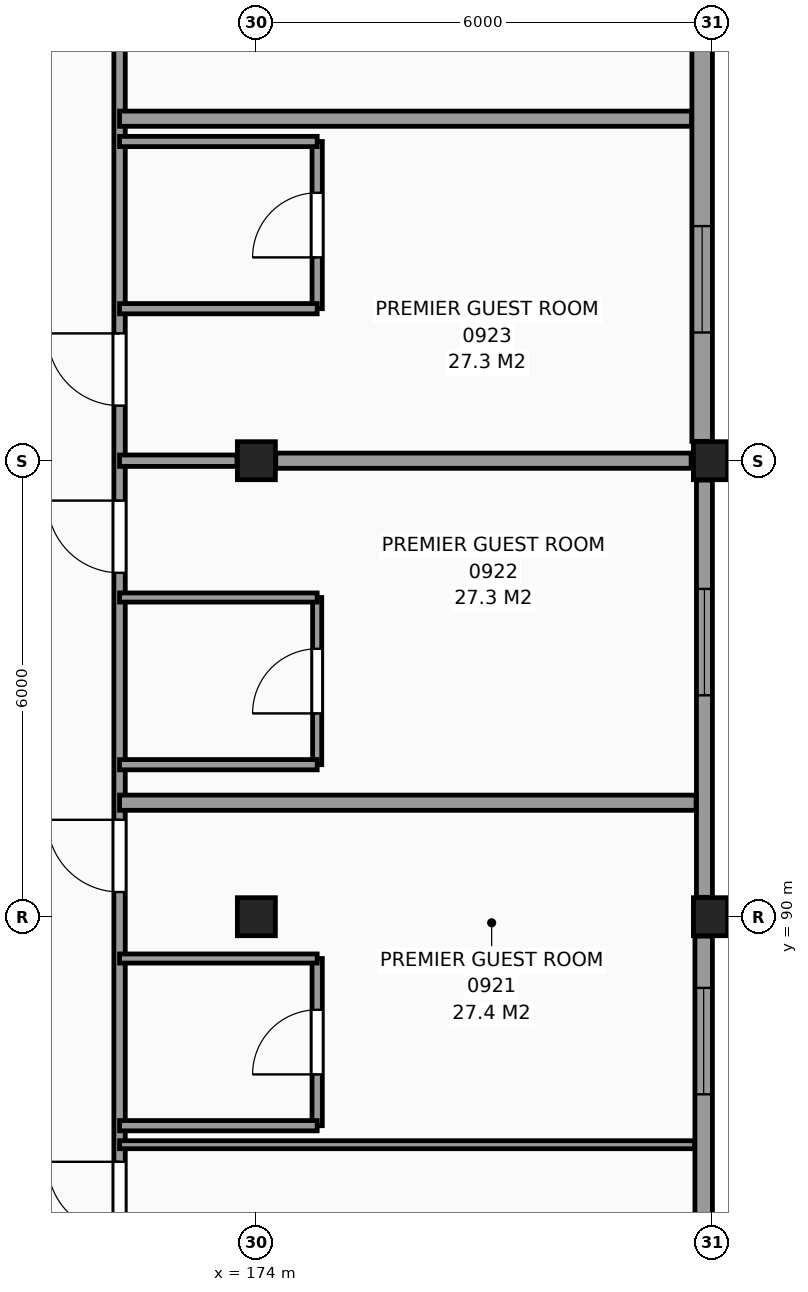
"""IFC4 building model, lengths in metres.
Left out: names, types, materials, properties, quantities, classifications, styles, units other than length and angle.
Written with IfcOpenShell. Run it as: python <this file> out.ifc"""

import sys

from ifc_helpers import new_model, si_unit, direction, frame, frame_2d, origin, origin_2d, place, context, subcontext, project, spatial, rectangle, extrude, element, fill, save


model = new_model("IFC4")
c1 = context("Model", 3, precision=1e-05, world=origin(), true_north=direction((0.0, 1.0)))
c2 = subcontext(c1, "Body", "Model", "MODEL_VIEW")
j1 = project(units=[si_unit("LENGTHUNIT", "METRE"), si_unit("PLANEANGLEUNIT", "RADIAN")], contexts=[c1])
p1 = place(None, origin())
s1 = spatial("IfcSite", under=j1, at=p1, CompositionType="ELEMENT")
p2 = place(p1, origin())
s2 = spatial("IfcBuilding", under=s1, at=p2, CompositionType="ELEMENT")
p3 = place(p2, frame((0.0, 0.0, 38.1)))
s3 = spatial("IfcBuildingStorey", under=s2, at=p3, CompositionType="ELEMENT", Elevation=38.1)
for number, where, z_axis, x_axis in (
    (1, (174.0, 90.0, 0.0), (0.0, 0.0, 1.0), (1.0, 0.0, 0.0)),
    (2, (174.0, 96.0, 0.0), (0.0, 0.0, 1.0), (1.0, 0.0, 0.0)),
    (3, (180.0, 90.0, 0.0), (0.0, 0.0, 1.0), (1.0, 0.0, 0.0)),
    (4, (180.0, 96.0, 0.0), (0.0, 0.0, 1.0), (1.0, 0.0, 0.0)),
):
    element("IfcColumn", number, at=place(p3, frame(where, z_axis=z_axis, x_axis=x_axis)), inside=s3, PredefinedType="COLUMN", context=c2, shape_type="SweptSolid", body=[
        extrude(rectangle(XDim=0.5, YDim=0.5, at=origin_2d()), origin(), (0.0, 0.0, 1.0), 3.3),
    ])
p4 = place(p3, frame((179.885, 84.255, 0.0), z_axis=(0.0, 0.0, 1.0), x_axis=(0.0, 1.0, 0.0)))
e5 = element("IfcWall", 5, at=p4, inside=s3, PredefinedType="SOLIDWALL", context=c2, shape_type="SweptSolid", body=[
    extrude(rectangle(XDim=5.49, YDim=0.23, at=frame_2d((2.745, 0.0))), origin(), (0.0, 0.0, 1.0), 2.41),
])
p5 = place(p4, frame((3.408, 0.0, 0.8)))
e6 = element("IfcOpeningElement", 6, at=p5, cuts=e5, PredefinedType="OPENING", context=c2, shape_type="SweptSolid", body=[
    extrude(rectangle(XDim=1.4, YDim=1.4, at=frame_2d((0.7, 0.7))), frame((0.0, 0.125, 0.0), z_axis=(0.0, -1.0, 0.0), x_axis=(1.0, 0.0, 0.0)), (0.0, 0.0, 1.0), 0.25),
])
p6 = place(p3, frame((179.895, 90.255, 0.0), z_axis=(0.0, 0.0, 1.0), x_axis=(0.0, 1.0, 0.0)))
e7 = element("IfcWall", 7, at=p6, inside=s3, PredefinedType="SOLIDWALL", context=c2, shape_type="SweptSolid", body=[
    extrude(rectangle(XDim=5.49, YDim=0.21, at=frame_2d((2.745, 0.0))), origin(), (0.0, 0.0, 1.0), 2.41),
])
p7 = place(p6, frame((2.658, 0.0, 0.8)))
e8 = element("IfcOpeningElement", 8, at=p7, cuts=e7, PredefinedType="OPENING", context=c2, shape_type="SweptSolid", body=[
    extrude(rectangle(XDim=1.4, YDim=1.4, at=frame_2d((0.7, 0.7))), frame((0.0, 0.115, 0.0), z_axis=(0.0, -1.0, 0.0), x_axis=(1.0, 0.0, 0.0)), (0.0, 0.0, 1.0), 0.23),
])
p8 = place(p3, frame((179.865, 96.255, 0.0), z_axis=(0.0, 0.0, 1.0), x_axis=(0.0, 1.0, 0.0)))
e9 = element("IfcWall", 9, at=p8, inside=s3, PredefinedType="SOLIDWALL", context=c2, shape_type="SweptSolid", body=[
    extrude(rectangle(XDim=5.49, YDim=0.27, at=frame_2d((2.745, 0.0))), origin(), (0.0, 0.0, 1.0), 2.41),
])
p9 = place(p8, frame((1.432, 0.0, 0.8)))
e10 = element("IfcOpeningElement", 10, at=p9, cuts=e9, PredefinedType="OPENING", context=c2, shape_type="SweptSolid", body=[
    extrude(rectangle(XDim=1.4, YDim=1.4, at=frame_2d((0.7, 0.7))), frame((0.0, 0.145, 0.0), z_axis=(0.0, -1.0, 0.0), x_axis=(1.0, 0.0, 0.0)), (0.0, 0.0, 1.0), 0.29),
])
p10 = place(p3, frame((172.2, 42.215, 0.0), z_axis=(0.0, 0.0, 1.0), x_axis=(0.0, 1.0, 0.0)))
e11 = element("IfcWall", 11, at=p10, inside=s3, PredefinedType="PARTITIONING", context=c2, shape_type="SweptSolid", body=[
    extrude(rectangle(XDim=65.605, YDim=0.15, at=frame_2d((32.802, 0.0))), origin(), (0.0, 0.0, 1.0), 3.06),
])
p11 = place(p10, frame((0.46, 0.0, 0.0)))
e12 = element("IfcOpeningElement", 12, at=p11, cuts=e11, PredefinedType="OPENING", context=c2, shape_type="SweptSolid", body=[
    extrude(rectangle(XDim=0.95, YDim=2.1, at=frame_2d((0.475, 1.05))), frame((0.0, 0.085, 0.0), z_axis=(0.0, -1.0, 0.0), x_axis=(1.0, 0.0, 0.0)), (0.0, 0.0, 1.0), 0.17),
])
p12 = place(p10, frame((4.91, 0.0, 0.0)))
e13 = element("IfcOpeningElement", 13, at=p12, cuts=e11, PredefinedType="OPENING", context=c2, shape_type="SweptSolid", body=[
    extrude(rectangle(XDim=0.95, YDim=2.1, at=frame_2d((0.475, 1.05))), frame((0.0, 0.085, 0.0), z_axis=(0.0, -1.0, 0.0), x_axis=(1.0, 0.0, 0.0)), (0.0, 0.0, 1.0), 0.17),
])
p13 = place(p10, frame((12.11, 0.0, 0.0)))
e14 = element("IfcOpeningElement", 14, at=p13, cuts=e11, PredefinedType="OPENING", context=c2, shape_type="SweptSolid", body=[
    extrude(rectangle(XDim=0.95, YDim=2.1, at=frame_2d((0.475, 1.05))), frame((0.0, 0.085, 0.0), z_axis=(0.0, -1.0, 0.0), x_axis=(1.0, 0.0, 0.0)), (0.0, 0.0, 1.0), 0.17),
])
p14 = place(p10, frame((20.36, 0.0, 0.0)))
e15 = element("IfcOpeningElement", 15, at=p14, cuts=e11, PredefinedType="OPENING", context=c2, shape_type="SweptSolid", body=[
    extrude(rectangle(XDim=0.95, YDim=2.1, at=frame_2d((0.475, 1.05))), frame((0.0, 0.085, 0.0), z_axis=(0.0, -1.0, 0.0), x_axis=(1.0, 0.0, 0.0)), (0.0, 0.0, 1.0), 0.17),
])
p15 = place(p10, frame((22.91, 0.0, 0.0)))
e16 = element("IfcOpeningElement", 16, at=p15, cuts=e11, PredefinedType="OPENING", context=c2, shape_type="SweptSolid", body=[
    extrude(rectangle(XDim=0.95, YDim=2.1, at=frame_2d((0.475, 1.05))), frame((0.0, 0.085, 0.0), z_axis=(0.0, -1.0, 0.0), x_axis=(1.0, 0.0, 0.0)), (0.0, 0.0, 1.0), 0.17),
])
p16 = place(p10, frame((30.11, 0.0, 0.0)))
e17 = element("IfcOpeningElement", 17, at=p16, cuts=e11, PredefinedType="OPENING", context=c2, shape_type="SweptSolid", body=[
    extrude(rectangle(XDim=0.95, YDim=2.1, at=frame_2d((0.475, 1.05))), frame((0.0, 0.085, 0.0), z_axis=(0.0, -1.0, 0.0), x_axis=(1.0, 0.0, 0.0)), (0.0, 0.0, 1.0), 0.17),
])
p17 = place(p10, frame((34.31, 0.0, 0.0)))
e18 = element("IfcOpeningElement", 18, at=p17, cuts=e11, PredefinedType="OPENING", context=c2, shape_type="SweptSolid", body=[
    extrude(rectangle(XDim=0.95, YDim=2.1, at=frame_2d((0.475, 1.05))), frame((0.0, 0.085, 0.0), z_axis=(0.0, -1.0, 0.0), x_axis=(1.0, 0.0, 0.0)), (0.0, 0.0, 1.0), 0.17),
])
p18 = place(p10, frame((43.61, 0.0, 0.0)))
e19 = element("IfcOpeningElement", 19, at=p18, cuts=e11, PredefinedType="OPENING", context=c2, shape_type="SweptSolid", body=[
    extrude(rectangle(XDim=0.95, YDim=2.1, at=frame_2d((0.475, 1.05))), frame((0.0, 0.085, 0.0), z_axis=(0.0, -1.0, 0.0), x_axis=(1.0, 0.0, 0.0)), (0.0, 0.0, 1.0), 0.17),
])
p19 = place(p10, frame((48.11, 0.0, 0.0)))
e20 = element("IfcOpeningElement", 20, at=p19, cuts=e11, PredefinedType="OPENING", context=c2, shape_type="SweptSolid", body=[
    extrude(rectangle(XDim=0.95, YDim=2.1, at=frame_2d((0.475, 1.05))), frame((0.0, 0.085, 0.0), z_axis=(0.0, -1.0, 0.0), x_axis=(1.0, 0.0, 0.0)), (0.0, 0.0, 1.0), 0.17),
])
p20 = place(p10, frame((52.31, 0.0, 0.0)))
e21 = element("IfcOpeningElement", 21, at=p20, cuts=e11, PredefinedType="OPENING", context=c2, shape_type="SweptSolid", body=[
    extrude(rectangle(XDim=0.95, YDim=2.1, at=frame_2d((0.475, 1.05))), frame((0.0, 0.085, 0.0), z_axis=(0.0, -1.0, 0.0), x_axis=(1.0, 0.0, 0.0)), (0.0, 0.0, 1.0), 0.17),
])
p21 = place(p10, frame((54.51, 0.0, 0.0)))
e22 = element("IfcOpeningElement", 22, at=p21, cuts=e11, PredefinedType="OPENING", context=c2, shape_type="SweptSolid", body=[
    extrude(rectangle(XDim=0.95, YDim=2.1, at=frame_2d((0.475, 1.05))), frame((0.0, 0.085, 0.0), z_axis=(0.0, -1.0, 0.0), x_axis=(1.0, 0.0, 0.0)), (0.0, 0.0, 1.0), 0.17),
])
p22 = place(p10, frame((60.51, 0.0, 0.0)))
e23 = element("IfcOpeningElement", 23, at=p22, cuts=e11, PredefinedType="OPENING", context=c2, shape_type="SweptSolid", body=[
    extrude(rectangle(XDim=0.95, YDim=2.1, at=frame_2d((0.475, 1.05))), frame((0.0, 0.085, 0.0), z_axis=(0.0, -1.0, 0.0), x_axis=(1.0, 0.0, 0.0)), (0.0, 0.0, 1.0), 0.17),
])
p23 = place(p3, frame((174.8, 87.25, 0.0), z_axis=(0.0, 0.0, 1.0), x_axis=(0.0, 1.0, 0.0)))
e24 = element("IfcWall", 24, at=p23, inside=s3, PredefinedType="PARTITIONING", context=c2, shape_type="SweptSolid", body=[
    extrude(rectangle(XDim=2.2, YDim=0.135, at=frame_2d((1.1, 0.0))), origin(), (0.0, 0.0, 1.0), 3.06),
])
p24 = place(p23, frame((0.675, 0.0, 0.0)))
e25 = element("IfcOpeningElement", 25, at=p24, cuts=e24, PredefinedType="OPENING", context=c2, shape_type="SweptSolid", body=[
    extrude(rectangle(XDim=0.85, YDim=2.1, at=frame_2d((0.425, 1.05))), frame((0.0, 0.078, 0.0), z_axis=(0.0, -1.0, 0.0), x_axis=(1.0, 0.0, 0.0)), (0.0, 0.0, 1.0), 0.155),
])
p25 = place(p3, frame((174.8, 92.0, 0.0), z_axis=(0.0, 0.0, 1.0), x_axis=(0.0, 1.0, 0.0)))
e26 = element("IfcWall", 26, at=p25, inside=s3, PredefinedType="PARTITIONING", context=c2, shape_type="SweptSolid", body=[
    extrude(rectangle(XDim=2.2, YDim=0.12, at=frame_2d((1.1, 0.0))), origin(), (0.0, 0.0, 1.0), 3.06),
])
p26 = place(p25, frame((0.675, 0.0, 0.0)))
e27 = element("IfcOpeningElement", 27, at=p26, cuts=e26, PredefinedType="OPENING", context=c2, shape_type="SweptSolid", body=[
    extrude(rectangle(XDim=0.85, YDim=2.1, at=frame_2d((0.425, 1.05))), frame((0.0, 0.07, 0.0), z_axis=(0.0, -1.0, 0.0), x_axis=(1.0, 0.0, 0.0)), (0.0, 0.0, 1.0), 0.14),
])
p27 = place(p3, frame((174.8, 98.0, 0.0), z_axis=(0.0, 0.0, 1.0), x_axis=(0.0, 1.0, 0.0)))
e28 = element("IfcWall", 28, at=p27, inside=s3, PredefinedType="PARTITIONING", context=c2, shape_type="SweptSolid", body=[
    extrude(rectangle(XDim=2.2, YDim=0.135, at=frame_2d((1.1, 0.0))), origin(), (0.0, 0.0, 1.0), 3.06),
])
p28 = place(p27, frame((0.675, 0.0, 0.0)))
e29 = element("IfcOpeningElement", 29, at=p28, cuts=e28, PredefinedType="OPENING", context=c2, shape_type="SweptSolid", body=[
    extrude(rectangle(XDim=0.85, YDim=2.1, at=frame_2d((0.425, 1.05))), frame((0.0, 0.078, 0.0), z_axis=(0.0, -1.0, 0.0), x_axis=(1.0, 0.0, 0.0)), (0.0, 0.0, 1.0), 0.155),
])
p29 = place(p3, frame((172.2, 87.0, 0.0), z_axis=(0.0, 0.0, 1.0), x_axis=(1.0, 0.0, 0.0)))
e30 = element("IfcWall", 30, at=p29, inside=s3, PredefinedType="PARTITIONING", context=c2, shape_type="SweptSolid", body=[
    extrude(rectangle(XDim=7.565, YDim=0.105, at=frame_2d((3.782, 0.0))), origin(), (0.0, 0.0, 1.0), 3.06),
])
p30 = place(p3, frame((172.2, 87.25, 0.0), z_axis=(0.0, 0.0, 1.0), x_axis=(1.0, 0.0, 0.0)))
e31 = element("IfcWall", 31, at=p30, inside=s3, PredefinedType="PARTITIONING", context=c2, shape_type="SweptSolid", body=[
    extrude(rectangle(XDim=2.6, YDim=0.135, at=frame_2d((1.3, 0.0))), origin(), (0.0, 0.0, 1.0), 3.06),
])
p31 = place(p3, frame((172.2, 89.45, 0.0), z_axis=(0.0, 0.0, 1.0), x_axis=(1.0, 0.0, 0.0)))
e32 = element("IfcWall", 32, at=p31, inside=s3, PredefinedType="PARTITIONING", context=c2, shape_type="SweptSolid", body=[
    extrude(rectangle(XDim=2.6, YDim=0.12, at=frame_2d((1.3, 0.0))), origin(), (0.0, 0.0, 1.0), 3.06),
])
p32 = place(p3, frame((172.2, 91.5, 0.0), z_axis=(0.0, 0.0, 1.0), x_axis=(1.0, 0.0, 0.0)))
e33 = element("IfcWall", 33, at=p32, inside=s3, PredefinedType="PARTITIONING", context=c2, shape_type="SweptSolid", body=[
    extrude(rectangle(XDim=7.585, YDim=0.2, at=frame_2d((3.792, 0.0))), origin(), (0.0, 0.0, 1.0), 3.06),
])
p33 = place(p3, frame((172.2, 92.0, 0.0), z_axis=(0.0, 0.0, 1.0), x_axis=(1.0, 0.0, 0.0)))
e34 = element("IfcWall", 34, at=p33, inside=s3, PredefinedType="PARTITIONING", context=c2, shape_type="SweptSolid", body=[
    extrude(rectangle(XDim=2.6, YDim=0.135, at=frame_2d((1.3, 0.0))), origin(), (0.0, 0.0, 1.0), 3.06),
])
p34 = place(p3, frame((172.2, 94.2, 0.0), z_axis=(0.0, 0.0, 1.0), x_axis=(1.0, 0.0, 0.0)))
e35 = element("IfcWall", 35, at=p34, inside=s3, PredefinedType="PARTITIONING", context=c2, shape_type="SweptSolid", body=[
    extrude(rectangle(XDim=2.6, YDim=0.12, at=frame_2d((1.3, 0.0))), origin(), (0.0, 0.0, 1.0), 3.06),
])
p35 = place(p3, frame((172.2, 96.0, 0.0), z_axis=(0.0, 0.0, 1.0), x_axis=(1.0, 0.0, 0.0)))
e36 = element("IfcWall", 36, at=p35, inside=s3, PredefinedType="PARTITIONING", context=c2, shape_type="SweptSolid", body=[
    extrude(rectangle(XDim=1.545, YDim=0.15, at=frame_2d((0.772, 0.0))), origin(), (0.0, 0.0, 1.0), 2.61),
])
p36 = place(p3, frame((174.255, 96.0, 0.0), z_axis=(0.0, 0.0, 1.0), x_axis=(1.0, 0.0, 0.0)))
e37 = element("IfcWall", 37, at=p36, inside=s3, PredefinedType="PARTITIONING", context=c2, shape_type="SweptSolid", body=[
    extrude(rectangle(XDim=5.465, YDim=0.2, at=frame_2d((2.732, 0.0))), origin(), (0.0, 0.0, 1.0), 2.77),
])
for number, where, z_axis, x_axis in (
    (38, (172.2, 98.0, 0.0), (0.0, 0.0, 1.0), (1.0, 0.0, 0.0)),
    (39, (172.2, 100.2, 0.0), (0.0, 0.0, 1.0), (1.0, 0.0, 0.0)),
):
    element("IfcWall", number, at=place(p3, frame(where, z_axis=z_axis, x_axis=x_axis)), inside=s3, PredefinedType="PARTITIONING", context=c2, shape_type="SweptSolid", body=[
        extrude(rectangle(XDim=2.6, YDim=0.135, at=frame_2d((1.3, 0.0))), origin(), (0.0, 0.0, 1.0), 3.06),
    ])
p37 = place(p3, frame((172.2, 100.5, 0.0), z_axis=(0.0, 0.0, 1.0), x_axis=(1.0, 0.0, 0.0)))
e40 = element("IfcWall", 40, at=p37, inside=s3, PredefinedType="PARTITIONING", context=c2, shape_type="SweptSolid", body=[
    extrude(rectangle(XDim=7.525, YDim=0.2, at=frame_2d((3.763, 0.0))), origin(), (0.0, 0.0, 1.0), 3.06),
])
p38 = place(p5, origin())
e41 = element("IfcWindow", 41, at=p38, inside=s3, PartitioningType="SINGLE_PANEL", PredefinedType="WINDOW", context=c2, shape_type="SweptSolid", body=[
    extrude(rectangle(XDim=1.4, YDim=1.4, at=frame_2d((0.7, 0.7))), frame((0.0, 0.03, 0.0), z_axis=(0.0, -1.0, 0.0), x_axis=(1.0, 0.0, 0.0)), (0.0, 0.0, 1.0), 0.06),
])
fill(e6, e41)
p39 = place(p7, origin())
e42 = element("IfcWindow", 42, at=p39, inside=s3, PartitioningType="SINGLE_PANEL", PredefinedType="WINDOW", context=c2, shape_type="SweptSolid", body=[
    extrude(rectangle(XDim=1.4, YDim=1.4, at=frame_2d((0.7, 0.7))), frame((0.0, 0.03, 0.0), z_axis=(0.0, -1.0, 0.0), x_axis=(1.0, 0.0, 0.0)), (0.0, 0.0, 1.0), 0.06),
])
fill(e8, e42)
p40 = place(p9, origin())
e43 = element("IfcWindow", 43, at=p40, inside=s3, PartitioningType="SINGLE_PANEL", PredefinedType="WINDOW", context=c2, shape_type="SweptSolid", body=[
    extrude(rectangle(XDim=1.4, YDim=1.4, at=frame_2d((0.7, 0.7))), frame((0.0, 0.03, 0.0), z_axis=(0.0, -1.0, 0.0), x_axis=(1.0, 0.0, 0.0)), (0.0, 0.0, 1.0), 0.06),
])
fill(e10, e43)
p41 = place(p18, origin())
e44 = element("IfcDoor", 44, at=p41, inside=s3, OperationType="SINGLE_SWING_RIGHT", PredefinedType="DOOR", context=c2, shape_type="SweptSolid", body=[
    extrude(rectangle(XDim=0.95, YDim=2.1, at=frame_2d((0.475, 1.05))), frame((0.0, 0.025, 0.0), z_axis=(0.0, -1.0, 0.0), x_axis=(1.0, 0.0, 0.0)), (0.0, 0.0, 1.0), 0.05),
])
fill(e19, e44)
p42 = place(p24, origin())
e45 = element("IfcDoor", 45, at=p42, inside=s3, OperationType="SINGLE_SWING_LEFT", PredefinedType="DOOR", context=c2, shape_type="SweptSolid", body=[
    extrude(rectangle(XDim=0.85, YDim=2.1, at=frame_2d((0.425, 1.05))), frame((0.0, 0.025, 0.0), z_axis=(0.0, -1.0, 0.0), x_axis=(1.0, 0.0, 0.0)), (0.0, 0.0, 1.0), 0.05),
])
fill(e25, e45)
p43 = place(p19, origin())
e46 = element("IfcDoor", 46, at=p43, inside=s3, OperationType="SINGLE_SWING_RIGHT", PredefinedType="DOOR", context=c2, shape_type="SweptSolid", body=[
    extrude(rectangle(XDim=0.95, YDim=2.1, at=frame_2d((0.475, 1.05))), frame((0.0, 0.025, 0.0), z_axis=(0.0, -1.0, 0.0), x_axis=(1.0, 0.0, 0.0)), (0.0, 0.0, 1.0), 0.05),
])
fill(e20, e46)
p44 = place(p26, origin())
e47 = element("IfcDoor", 47, at=p44, inside=s3, OperationType="SINGLE_SWING_LEFT", PredefinedType="DOOR", context=c2, shape_type="SweptSolid", body=[
    extrude(rectangle(XDim=0.85, YDim=2.1, at=frame_2d((0.425, 1.05))), frame((0.0, 0.025, 0.0), z_axis=(0.0, -1.0, 0.0), x_axis=(1.0, 0.0, 0.0)), (0.0, 0.0, 1.0), 0.05),
])
fill(e27, e47)
p45 = place(p20, origin())
e48 = element("IfcDoor", 48, at=p45, inside=s3, OperationType="SINGLE_SWING_RIGHT", PredefinedType="DOOR", context=c2, shape_type="SweptSolid", body=[
    extrude(rectangle(XDim=0.95, YDim=2.1, at=frame_2d((0.475, 1.05))), frame((0.0, 0.025, 0.0), z_axis=(0.0, -1.0, 0.0), x_axis=(1.0, 0.0, 0.0)), (0.0, 0.0, 1.0), 0.05),
])
fill(e21, e48)
p46 = place(p28, origin())
e49 = element("IfcDoor", 49, at=p46, inside=s3, OperationType="SINGLE_SWING_LEFT", PredefinedType="DOOR", context=c2, shape_type="SweptSolid", body=[
    extrude(rectangle(XDim=0.85, YDim=2.1, at=frame_2d((0.425, 1.05))), frame((0.0, 0.025, 0.0), z_axis=(0.0, -1.0, 0.0), x_axis=(1.0, 0.0, 0.0)), (0.0, 0.0, 1.0), 0.05),
])
fill(e29, e49)
p47 = place(p21, origin())
e50 = element("IfcDoor", 50, at=p47, inside=s3, OperationType="SINGLE_SWING_RIGHT", PredefinedType="DOOR", context=c2, shape_type="SweptSolid", body=[
    extrude(rectangle(XDim=0.95, YDim=2.1, at=frame_2d((0.475, 1.05))), frame((0.0, 0.025, 0.0), z_axis=(0.0, -1.0, 0.0), x_axis=(1.0, 0.0, 0.0)), (0.0, 0.0, 1.0), 0.05),
])
fill(e22, e50)
save(model, sys.argv[1])
